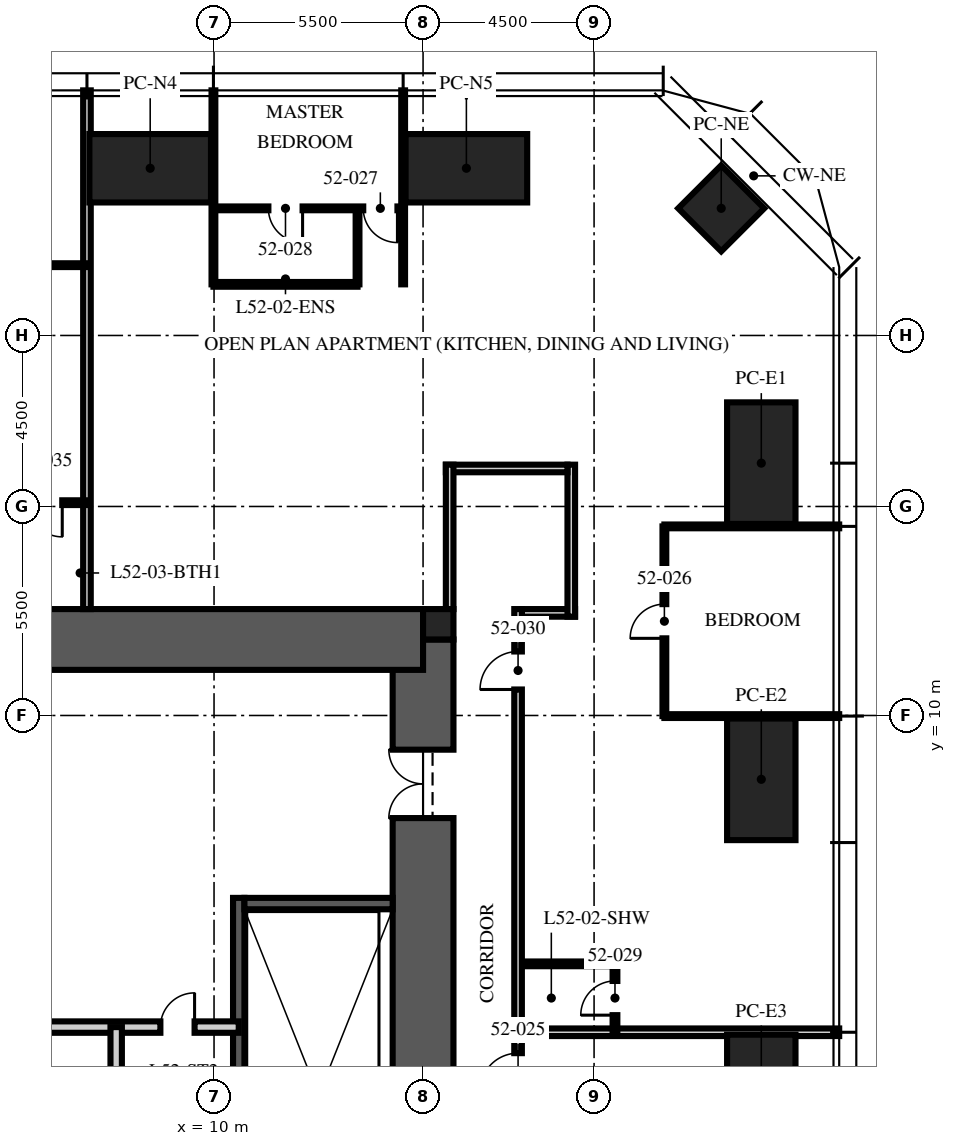
"""IFC4 building model, lengths in metres.
Left out: names, types, materials, properties, quantities, classifications, styles, units other than length and angle.
Written with IfcOpenShell. Run it as: python <this file> out.ifc"""

import sys

from ifc_helpers import new_model, si_unit, direction, frame, frame_2d, origin, origin_2d, place, context, subcontext, project, spatial, rectangle, hollow_rectangle, extrude, element, fill, save


model = new_model("IFC4")
c1 = context("Model", 3, precision=1e-05, world=origin(), true_north=direction((0.0, 1.0)))
c2 = subcontext(c1, "Body", "Model", "MODEL_VIEW")
j1 = project(units=[si_unit("LENGTHUNIT", "METRE"), si_unit("PLANEANGLEUNIT", "RADIAN")], contexts=[c1])
p1 = place(None, origin())
s1 = spatial("IfcSite", under=j1, at=p1, CompositionType="ELEMENT")
p2 = place(p1, origin())
s2 = spatial("IfcBuilding", under=s1, at=p2, CompositionType="ELEMENT")
p3 = place(p2, frame((0.0, 0.0, 210.75)))
s3 = spatial("IfcBuildingStorey", under=s2, at=p3, CompositionType="ELEMENT", Elevation=210.75)
p4 = place(p3, frame((15.5, -12.0, -0.25), z_axis=(0.0, 0.0, 1.0), x_axis=(0.0, 1.0, 0.0)))
e1 = element("IfcWall", 1, at=p4, inside=s3, PredefinedType="SHEAR", context=c2, shape_type="SweptSolid", body=[
    extrude(rectangle(XDim=24.0, YDim=1.6, at=frame_2d((12.0, 0.0))), origin(), (0.0, 0.0, 1.0), 3.75),
])
p5 = place(p4, frame((3.2, 0.0, 0.25)))
e2 = element("IfcOpeningElement", 2, at=p5, cuts=e1, PredefinedType="OPENING", context=c2, shape_type="SweptSolid", body=[
    extrude(rectangle(XDim=1.2, YDim=2.1, at=frame_2d((0.6, 1.05))), frame((0.0, 0.81, 0.0), z_axis=(0.0, -1.0, 0.0), x_axis=(1.0, 0.0, 0.0)), (0.0, 0.0, 1.0), 1.62),
])
p6 = place(p4, frame((19.3, 0.0, 0.25)))
e3 = element("IfcOpeningElement", 3, at=p6, cuts=e1, PredefinedType="OPENING", context=c2, shape_type="SweptSolid", body=[
    extrude(rectangle(XDim=1.8, YDim=2.1, at=frame_2d((0.9, 1.05))), frame((0.0, 0.81, 0.0), z_axis=(0.0, -1.0, 0.0), x_axis=(1.0, 0.0, 0.0)), (0.0, 0.0, 1.0), 1.62),
])
p7 = place(p3, frame((-15.5, 12.0, -0.25), z_axis=(0.0, 0.0, 1.0), x_axis=(1.0, 0.0, 0.0)))
e4 = element("IfcWall", 4, at=p7, inside=s3, PredefinedType="SHEAR", context=c2, shape_type="SweptSolid", body=[
    extrude(rectangle(XDim=31.0, YDim=1.6, at=frame_2d((15.5, 0.0))), origin(), (0.0, 0.0, 1.0), 3.75),
])
p8 = place(p3, frame((15.9, 12.4, -0.25), z_axis=(0.0, 0.0, 1.0), x_axis=(1.0, 0.0, 0.0)))
e5 = element("IfcColumn", 5, at=p8, inside=s3, PredefinedType="COLUMN", context=c2, shape_type="SweptSolid", body=[
    extrude(rectangle(XDim=0.8, YDim=0.8, at=origin_2d()), origin(), (0.0, 0.0, 1.0), 3.75),
])
for number, where, z_axis, x_axis in (
    (6, (8.32, 24.4, 0.0), (0.0, 0.0, 1.0), (1.0, 0.0, 0.0)),
    (7, (16.64, 24.4, 0.0), (0.0, 0.0, 1.0), (1.0, 0.0, 0.0)),
    (8, (24.4, 16.64, 0.0), (0.0, 0.0, 1.0), (0.0, 1.0, 0.0)),
    (9, (24.4, 8.32, 0.0), (0.0, 0.0, 1.0), (0.0, 1.0, 0.0)),
    (10, (24.4, 0.0, 0.0), (0.0, 0.0, 1.0), (0.0, 1.0, 0.0)),
):
    element("IfcColumn", number, at=place(p3, frame(where, z_axis=z_axis, x_axis=x_axis)), inside=s3, PredefinedType="COLUMN", context=c2, shape_type="SweptSolid", body=[
        extrude(hollow_rectangle(XDim=3.2, YDim=1.8, WallThickness=0.2, at=origin_2d()), origin(), (0.0, 0.0, 1.0), 3.75),
    ])
p9 = place(p3, frame((23.346, 23.346, 0.0), z_axis=(0.0, 0.0, 1.0), x_axis=(0.707106781187, -0.707106781187, 0.0)))
e11 = element("IfcColumn", 11, at=p9, inside=s3, PredefinedType="COLUMN", context=c2, shape_type="SweptSolid", body=[
    extrude(hollow_rectangle(XDim=1.6, YDim=1.6, WallThickness=0.1, at=origin_2d()), origin(), (0.0, 0.0, 1.0), 3.75),
])
p10 = place(p3, frame((10.65, -4.9, 0.0), z_axis=(0.0, 0.0, 1.0), x_axis=(0.0, 1.0, 0.0)))
e12 = element("IfcWall", 12, at=p10, inside=s3, PredefinedType="SOLIDWALL", context=c2, shape_type="SweptSolid", body=[
    extrude(rectangle(XDim=10.1, YDim=0.3, at=frame_2d((5.05, 0.0))), origin(), (0.0, 0.0, 1.0), 3.5),
])
p11 = place(p3, frame((14.7, 5.05, 0.0), z_axis=(0.0, 0.0, 1.0), x_axis=(-1.0, 0.0, 0.0)))
e13 = element("IfcWall", 13, at=p11, inside=s3, PredefinedType="SOLIDWALL", context=c2, shape_type="SweptSolid", body=[
    extrude(rectangle(XDim=3.9, YDim=0.3, at=frame_2d((1.95, 0.0))), origin(), (0.0, 0.0, 1.0), 3.5),
])
p12 = place(p3, frame((-10.65, 1.8, 0.0), z_axis=(0.0, 0.0, 1.0), x_axis=(1.0, 0.0, 0.0)))
e14 = element("IfcWall", 14, at=p12, inside=s3, PredefinedType="PARTITIONING", context=c2, shape_type="SweptSolid", body=[
    extrude(rectangle(XDim=21.3, YDim=0.3, at=frame_2d((10.65, 0.0))), origin(), (0.0, 0.0, 1.0), 3.5),
])
p13 = place(p12, frame((10.05, 0.0, 0.0)))
e15 = element("IfcOpeningElement", 15, at=p13, cuts=e14, PredefinedType="OPENING", context=c2, shape_type="SweptSolid", body=[
    extrude(rectangle(XDim=1.2, YDim=2.1, at=frame_2d((0.6, 1.05))), frame((0.0, 0.16, 0.0), z_axis=(0.0, -1.0, 0.0), x_axis=(1.0, 0.0, 0.0)), (0.0, 0.0, 1.0), 0.32),
])
p14 = place(p12, frame((19.238, 0.0, 0.0)))
e16 = element("IfcOpeningElement", 16, at=p14, cuts=e14, PredefinedType="OPENING", context=c2, shape_type="SweptSolid", body=[
    extrude(rectangle(XDim=0.9, YDim=2.1, at=frame_2d((0.45, 1.05))), frame((0.0, 0.16, 0.0), z_axis=(0.0, -1.0, 0.0), x_axis=(1.0, 0.0, 0.0)), (0.0, 0.0, 1.0), 0.32),
])
p15 = place(p3, frame((7.425, -2.848, 0.0), z_axis=(0.0, 0.0, 1.0), x_axis=(0.0, 1.0, 0.0)))
e17 = element("IfcWall", 17, at=p15, inside=s3, PredefinedType="PARTITIONING", context=c2, shape_type="SweptSolid", body=[
    extrude(rectangle(XDim=4.648, YDim=0.3, at=frame_2d((2.324, 0.0))), origin(), (0.0, 0.0, 1.0), 3.5),
])
p16 = place(p3, frame((18.1, 12.7, 0.0), z_axis=(0.0, 0.0, 1.0), x_axis=(1.0, 0.0, 0.0)))
e18 = element("IfcWall", 18, at=p16, inside=s3, PredefinedType="PARTITIONING", context=c2, shape_type="SweptSolid", body=[
    extrude(rectangle(XDim=1.4, YDim=0.2, at=frame_2d((0.7, 0.0))), origin(), (0.0, 0.0, 1.0), 2.81),
])
p17 = place(p3, frame((19.4, 12.6, 0.0), z_axis=(0.0, 0.0, 1.0), x_axis=(0.0, 1.0, 0.0)))
e19 = element("IfcWall", 19, at=p17, inside=s3, PredefinedType="PARTITIONING", context=c2, shape_type="SweptSolid", body=[
    extrude(rectangle(XDim=4.0, YDim=0.2, at=frame_2d((2.0, 0.0))), origin(), (0.0, 0.0, 1.0), 2.6),
])
p18 = place(p3, frame((19.3, 16.5, 0.0), z_axis=(0.0, 0.0, 1.0), x_axis=(-1.0, 0.0, 0.0)))
e20 = element("IfcWall", 20, at=p18, inside=s3, PredefinedType="PARTITIONING", context=c2, shape_type="SweptSolid", body=[
    extrude(rectangle(XDim=3.2, YDim=0.2, at=frame_2d((1.6, 0.0))), origin(), (0.0, 0.0, 1.0), 2.3),
])
p19 = place(p3, frame((16.2, 16.6, 0.0), z_axis=(0.0, 0.0, 1.0), x_axis=(0.0, -1.0, 0.0)))
e21 = element("IfcWall", 21, at=p19, inside=s3, PredefinedType="PARTITIONING", context=c2, shape_type="SweptSolid", body=[
    extrude(rectangle(XDim=3.8, YDim=0.2, at=frame_2d((1.9, 0.0))), origin(), (0.0, 0.0, 1.0), 2.3),
])
p20 = place(p3, frame((18.1, 1.664, 0.0), z_axis=(0.0, 0.0, 1.0), x_axis=(1.0, 0.0, 0.0)))
e22 = element("IfcWall", 22, at=p20, inside=s3, PredefinedType="PARTITIONING", context=c2, shape_type="SweptSolid", body=[
    extrude(rectangle(XDim=8.35, YDim=0.2, at=frame_2d((4.175, 0.0))), origin(), (0.0, 0.0, 1.0), 2.91),
])
for number, where, z_axis, x_axis in (
    (23, (21.85, 9.984, 0.0), (0.0, 0.0, 1.0), (1.0, 0.0, 0.0)),
    (24, (21.85, 14.976, 0.0), (0.0, 0.0, 1.0), (1.0, 0.0, 0.0)),
):
    element("IfcWall", number, at=place(p3, frame(where, z_axis=z_axis, x_axis=x_axis)), inside=s3, PredefinedType="PARTITIONING", context=c2, shape_type="SweptSolid", body=[
        extrude(rectangle(XDim=4.6, YDim=0.1, at=frame_2d((2.3, 0.0))), origin(), (0.0, 0.0, 1.0), 2.91),
    ])
for number, where, z_axis, x_axis in (
    (25, (14.976, 21.345, 0.0), (0.0, 0.0, 1.0), (0.0, 1.0, 0.0)),
    (26, (9.984, 21.345, 0.0), (0.0, 0.0, 1.0), (0.0, 1.0, 0.0)),
):
    element("IfcWall", number, at=place(p3, frame(where, z_axis=z_axis, x_axis=x_axis)), inside=s3, PredefinedType="PARTITIONING", context=c2, shape_type="SweptSolid", body=[
        extrude(rectangle(XDim=5.105, YDim=0.1, at=frame_2d((2.552, 0.0))), origin(), (0.0, 0.0, 1.0), 2.91),
    ])
p21 = place(p3, frame((6.656, 12.8, 0.0), z_axis=(0.0, 0.0, 1.0), x_axis=(0.0, 1.0, 0.0)))
e27 = element("IfcWall", 27, at=p21, inside=s3, PredefinedType="PARTITIONING", context=c2, shape_type="SweptSolid", body=[
    extrude(rectangle(XDim=13.65, YDim=0.2, at=frame_2d((6.825, 0.0))), origin(), (0.0, 0.0, 1.0), 2.91),
])
p22 = place(p3, frame((21.85, 9.984, 0.0), z_axis=(0.0, 0.0, 1.0), x_axis=(0.0, 1.0, 0.0)))
e28 = element("IfcWall", 28, at=p22, inside=s3, PredefinedType="PARTITIONING", context=c2, shape_type="SweptSolid", body=[
    extrude(rectangle(XDim=4.992, YDim=0.1, at=frame_2d((2.496, 0.0))), origin(), (0.0, 0.0, 1.0), 2.81),
])
p23 = place(p22, frame((2.046, 0.0, 0.0)))
e29 = element("IfcOpeningElement", 29, at=p23, cuts=e28, PredefinedType="OPENING", context=c2, shape_type="SweptSolid", body=[
    extrude(rectangle(XDim=0.9, YDim=2.1, at=frame_2d((0.45, 1.05))), frame((0.0, 0.06, 0.0), z_axis=(0.0, -1.0, 0.0), x_axis=(1.0, 0.0, 0.0)), (0.0, 0.0, 1.0), 0.12),
])
p24 = place(p3, frame((14.976, 23.345, 0.0), z_axis=(0.0, 0.0, 1.0), x_axis=(-1.0, 0.0, 0.0)))
e30 = element("IfcWall", 30, at=p24, inside=s3, PredefinedType="PARTITIONING", context=c2, shape_type="SweptSolid", body=[
    extrude(rectangle(XDim=4.992, YDim=0.1, at=frame_2d((2.496, 0.0))), origin(), (0.0, 0.0, 1.0), 2.81),
])
p25 = place(p24, frame((0.15, 0.0, 0.0)))
e31 = element("IfcOpeningElement", 31, at=p25, cuts=e30, PredefinedType="OPENING", context=c2, shape_type="SweptSolid", body=[
    extrude(rectangle(XDim=0.9, YDim=2.1, at=frame_2d((0.45, 1.05))), frame((0.0, 0.06, 0.0), z_axis=(0.0, -1.0, 0.0), x_axis=(1.0, 0.0, 0.0)), (0.0, 0.0, 1.0), 0.12),
])
p26 = place(p24, frame((2.646, 0.0, 0.0)))
e32 = element("IfcOpeningElement", 32, at=p26, cuts=e30, PredefinedType="OPENING", context=c2, shape_type="SweptSolid", body=[
    extrude(rectangle(XDim=0.9, YDim=2.1, at=frame_2d((0.45, 1.05))), frame((0.0, 0.06, 0.0), z_axis=(0.0, -1.0, 0.0), x_axis=(1.0, 0.0, 0.0)), (0.0, 0.0, 1.0), 0.12),
])
p27 = place(p3, frame((13.776, 21.345, 0.0), z_axis=(0.0, 0.0, 1.0), x_axis=(0.0, 1.0, 0.0)))
e33 = element("IfcWall", 33, at=p27, inside=s3, PredefinedType="PARTITIONING", context=c2, shape_type="SweptSolid", body=[
    extrude(rectangle(XDim=2.0, YDim=0.1, at=frame_2d((1.0, 0.0))), origin(), (0.0, 0.0, 1.0), 3.5),
])
p28 = place(p3, frame((13.776, 21.345, 0.0), z_axis=(0.0, 0.0, 1.0), x_axis=(-1.0, 0.0, 0.0)))
e34 = element("IfcWall", 34, at=p28, inside=s3, PredefinedType="PARTITIONING", context=c2, shape_type="SweptSolid", body=[
    extrude(rectangle(XDim=3.792, YDim=0.125, at=frame_2d((1.896, 0.0))), origin(), (0.0, 0.0, 1.0), 2.81),
])
p29 = place(p3, frame((20.55, 1.664, 0.0), z_axis=(0.0, 0.0, 1.0), x_axis=(0.0, 1.0, 0.0)))
e35 = element("IfcWall", 35, at=p29, inside=s3, PredefinedType="PARTITIONING", context=c2, shape_type="SweptSolid", body=[
    extrude(rectangle(XDim=1.8, YDim=0.125, at=frame_2d((0.9, 0.0))), origin(), (0.0, 0.0, 1.0), 3.5),
])
p30 = place(p29, frame((0.45, 0.0, 0.0)))
e36 = element("IfcOpeningElement", 36, at=p30, cuts=e35, PredefinedType="OPENING", context=c2, shape_type="SweptSolid", body=[
    extrude(rectangle(XDim=0.9, YDim=2.1, at=frame_2d((0.45, 1.05))), frame((0.0, 0.073, 0.0), z_axis=(0.0, -1.0, 0.0), x_axis=(1.0, 0.0, 0.0)), (0.0, 0.0, 1.0), 0.145),
])
p31 = place(p3, frame((18.1, 3.464, 0.0), z_axis=(0.0, 0.0, 1.0), x_axis=(1.0, 0.0, 0.0)))
e37 = element("IfcWall", 37, at=p31, inside=s3, PredefinedType="PARTITIONING", context=c2, shape_type="SweptSolid", body=[
    extrude(rectangle(XDim=2.45, YDim=0.125, at=frame_2d((1.225, 0.0))), origin(), (0.0, 0.0, 1.0), 3.5),
])
p32 = place(p3, frame((6.656, 21.85, 0.0), z_axis=(0.0, 0.0, 1.0), x_axis=(-1.0, 0.0, 0.0)))
e38 = element("IfcWall", 38, at=p32, inside=s3, PredefinedType="PARTITIONING", context=c2, shape_type="SweptSolid", body=[
    extrude(rectangle(XDim=4.992, YDim=0.1, at=frame_2d((2.496, 0.0))), origin(), (0.0, 0.0, 1.0), 2.81),
])
p33 = place(p32, frame((2.046, 0.0, 0.0)))
e39 = element("IfcOpeningElement", 39, at=p33, cuts=e38, PredefinedType="OPENING", context=c2, shape_type="SweptSolid", body=[
    extrude(rectangle(XDim=0.9, YDim=2.1, at=frame_2d((0.45, 1.05))), frame((0.0, 0.06, 0.0), z_axis=(0.0, -1.0, 0.0), x_axis=(1.0, 0.0, 0.0)), (0.0, 0.0, 1.0), 0.12),
])
p34 = place(p3, frame((6.656, 15.6, 0.0), z_axis=(0.0, 0.0, 1.0), x_axis=(-1.0, 0.0, 0.0)))
e40 = element("IfcWall", 40, at=p34, inside=s3, PredefinedType="PARTITIONING", context=c2, shape_type="SweptSolid", body=[
    extrude(rectangle(XDim=2.2, YDim=0.125, at=frame_2d((1.1, 0.0))), origin(), (0.0, 0.0, 1.0), 3.5),
])
p35 = place(p34, frame((0.65, 0.0, 0.0)))
e41 = element("IfcOpeningElement", 41, at=p35, cuts=e40, PredefinedType="OPENING", context=c2, shape_type="SweptSolid", body=[
    extrude(rectangle(XDim=0.9, YDim=2.1, at=frame_2d((0.45, 1.05))), frame((0.0, 0.073, 0.0), z_axis=(0.0, -1.0, 0.0), x_axis=(1.0, 0.0, 0.0)), (0.0, 0.0, 1.0), 0.145),
])
p36 = place(p3, frame((18.0, -13.0, 0.0), z_axis=(0.0, 0.0, 1.0), x_axis=(0.0, 1.0, 0.0)))
e42 = element("IfcWall", 42, at=p36, inside=s3, PredefinedType="PARTITIONING", context=c2, shape_type="SweptSolid", body=[
    extrude(rectangle(XDim=25.8, YDim=0.2, at=frame_2d((12.9, 0.0))), origin(), (0.0, 0.0, 1.0), 2.6),
])
p37 = place(p36, frame((13.114, 0.0, 0.0)))
e43 = element("IfcOpeningElement", 43, at=p37, cuts=e42, PredefinedType="OPENING", context=c2, shape_type="SweptSolid", body=[
    extrude(rectangle(XDim=1.0, YDim=2.2, at=frame_2d((0.5, 1.1))), frame((0.0, 0.11, 0.0), z_axis=(0.0, -1.0, 0.0), x_axis=(1.0, 0.0, 0.0)), (0.0, 0.0, 1.0), 0.22),
])
p38 = place(p36, frame((23.684, 0.0, 0.0)))
e44 = element("IfcOpeningElement", 44, at=p38, cuts=e42, PredefinedType="OPENING", context=c2, shape_type="SweptSolid", body=[
    extrude(rectangle(XDim=1.0, YDim=2.2, at=frame_2d((0.5, 1.1))), frame((0.0, 0.11, 0.0), z_axis=(0.0, -1.0, 0.0), x_axis=(1.0, 0.0, 0.0)), (0.0, 0.0, 1.0), 0.22),
])
p39 = place(p36, frame((4.6, 0.0, 0.0)))
e45 = element("IfcOpeningElement", 45, at=p39, cuts=e42, PredefinedType="OPENING", context=c2, shape_type="SweptSolid", body=[
    extrude(rectangle(XDim=1.0, YDim=2.2, at=frame_2d((0.5, 1.1))), frame((0.0, 0.11, 0.0), z_axis=(0.0, -1.0, 0.0), x_axis=(1.0, 0.0, 0.0)), (0.0, 0.0, 1.0), 0.22),
])
p40 = place(p6, origin())
e46 = element("IfcDoor", 46, at=p40, inside=s3, OperationType="DOUBLE_DOOR_SINGLE_SWING", PredefinedType="DOOR", context=c2, shape_type="SweptSolid", body=[
    extrude(rectangle(XDim=1.8, YDim=2.1, at=frame_2d((0.9, 1.05))), frame((0.0, 0.025, 0.0), z_axis=(0.0, -1.0, 0.0), x_axis=(1.0, 0.0, 0.0)), (0.0, 0.0, 1.0), 0.05),
])
fill(e3, e46)
p41 = place(p14, origin())
e47 = element("IfcDoor", 47, at=p41, inside=s3, OperationType="SINGLE_SWING_RIGHT", PredefinedType="DOOR", context=c2, shape_type="SweptSolid", body=[
    extrude(rectangle(XDim=0.9, YDim=2.1, at=frame_2d((0.45, 1.05))), frame((0.0, 0.025, 0.0), z_axis=(0.0, -1.0, 0.0), x_axis=(1.0, 0.0, 0.0)), (0.0, 0.0, 1.0), 0.05),
])
fill(e16, e47)
p42 = place(p37, origin())
e48 = element("IfcDoor", 48, at=p42, inside=s3, OperationType="SINGLE_SWING_LEFT", PredefinedType="DOOR", context=c2, shape_type="SweptSolid", body=[
    extrude(rectangle(XDim=1.0, YDim=2.2, at=frame_2d((0.5, 1.1))), frame((0.0, 0.025, 0.0), z_axis=(0.0, -1.0, 0.0), x_axis=(1.0, 0.0, 0.0)), (0.0, 0.0, 1.0), 0.05),
])
fill(e43, e48)
p43 = place(p23, origin())
e49 = element("IfcDoor", 49, at=p43, inside=s3, OperationType="SINGLE_SWING_LEFT", PredefinedType="DOOR", context=c2, shape_type="SweptSolid", body=[
    extrude(rectangle(XDim=0.9, YDim=2.1, at=frame_2d((0.45, 1.05))), frame((0.0, 0.025, 0.0), z_axis=(0.0, -1.0, 0.0), x_axis=(1.0, 0.0, 0.0)), (0.0, 0.0, 1.0), 0.05),
])
fill(e29, e49)
p44 = place(p25, origin())
e50 = element("IfcDoor", 50, at=p44, inside=s3, OperationType="SINGLE_SWING_LEFT", PredefinedType="DOOR", context=c2, shape_type="SweptSolid", body=[
    extrude(rectangle(XDim=0.9, YDim=2.1, at=frame_2d((0.45, 1.05))), frame((0.0, 0.025, 0.0), z_axis=(0.0, -1.0, 0.0), x_axis=(1.0, 0.0, 0.0)), (0.0, 0.0, 1.0), 0.05),
])
fill(e31, e50)
p45 = place(p26, origin())
e51 = element("IfcDoor", 51, at=p45, inside=s3, OperationType="SINGLE_SWING_LEFT", PredefinedType="DOOR", context=c2, shape_type="SweptSolid", body=[
    extrude(rectangle(XDim=0.9, YDim=2.1, at=frame_2d((0.45, 1.05))), frame((0.0, 0.025, 0.0), z_axis=(0.0, -1.0, 0.0), x_axis=(1.0, 0.0, 0.0)), (0.0, 0.0, 1.0), 0.05),
])
fill(e32, e51)
p46 = place(p30, origin())
e52 = element("IfcDoor", 52, at=p46, inside=s3, OperationType="SINGLE_SWING_LEFT", PredefinedType="DOOR", context=c2, shape_type="SweptSolid", body=[
    extrude(rectangle(XDim=0.9, YDim=2.1, at=frame_2d((0.45, 1.05))), frame((0.0, 0.025, 0.0), z_axis=(0.0, -1.0, 0.0), x_axis=(1.0, 0.0, 0.0)), (0.0, 0.0, 1.0), 0.05),
])
fill(e36, e52)
p47 = place(p38, origin())
e53 = element("IfcDoor", 53, at=p47, inside=s3, OperationType="SINGLE_SWING_LEFT", PredefinedType="DOOR", context=c2, shape_type="SweptSolid", body=[
    extrude(rectangle(XDim=1.0, YDim=2.2, at=frame_2d((0.5, 1.1))), frame((0.0, 0.025, 0.0), z_axis=(0.0, -1.0, 0.0), x_axis=(1.0, 0.0, 0.0)), (0.0, 0.0, 1.0), 0.05),
])
fill(e44, e53)
p48 = place(p35, origin())
e54 = element("IfcDoor", 54, at=p48, inside=s3, OperationType="SINGLE_SWING_LEFT", PredefinedType="DOOR", context=c2, shape_type="SweptSolid", body=[
    extrude(rectangle(XDim=0.9, YDim=2.1, at=frame_2d((0.45, 1.05))), frame((0.0, 0.025, 0.0), z_axis=(0.0, -1.0, 0.0), x_axis=(1.0, 0.0, 0.0)), (0.0, 0.0, 1.0), 0.05),
])
fill(e41, e54)
save(model, sys.argv[1])
